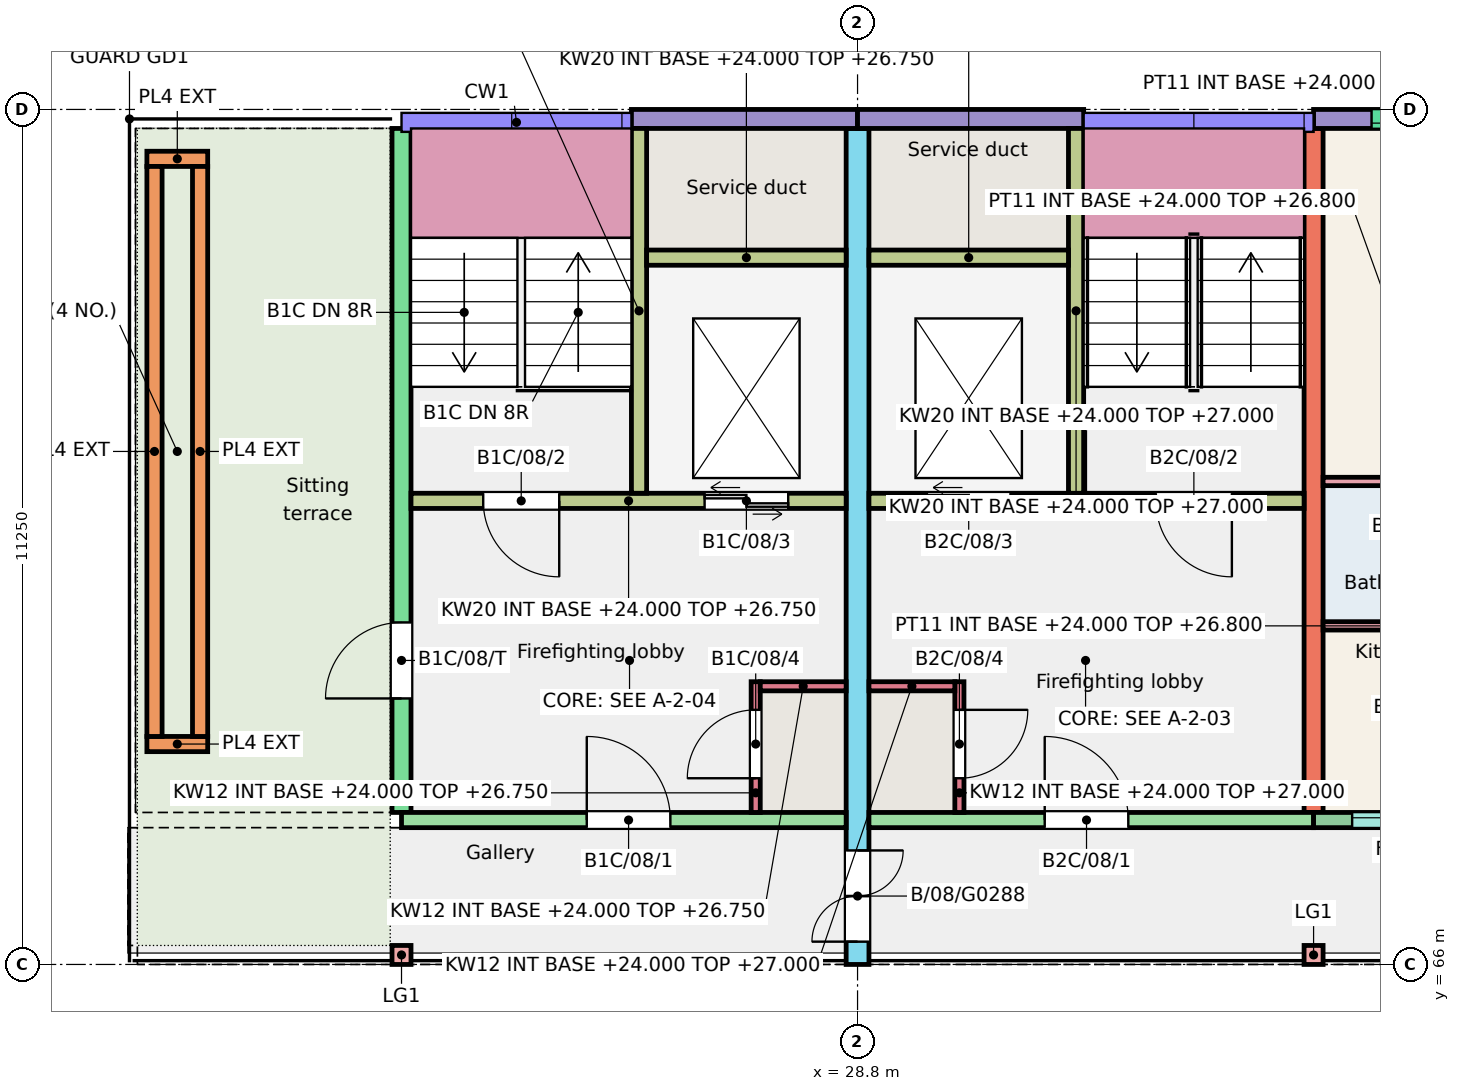
"""IFC4 building model, lengths in metres.
Left out: names, types, materials, properties, quantities, classifications, styles, units other than length and angle.
Written with IfcOpenShell. Run it as: python <this file> out.ifc"""

import sys

from ifc_helpers import new_model, si_unit, direction, frame, frame_2d, origin, origin_2d, place, context, subcontext, project, spatial, rectangle, extrude, element, fill, save


model = new_model("IFC4")
c1 = context("Model", 3, precision=1e-05, world=origin(), true_north=direction((0.0, 1.0)))
c2 = subcontext(c1, "Body", "Model", "MODEL_VIEW")
j1 = project(units=[si_unit("LENGTHUNIT", "METRE"), si_unit("PLANEANGLEUNIT", "RADIAN")], contexts=[c1])
p1 = place(None, origin())
s1 = spatial("IfcSite", under=j1, at=p1, CompositionType="ELEMENT")
p2 = place(p1, origin())
s2 = spatial("IfcBuilding", under=s1, at=p2, CompositionType="ELEMENT")
p3 = place(p2, frame((0.0, 0.0, 24.0)))
s3 = spatial("IfcBuildingStorey", under=s2, at=p3, CompositionType="ELEMENT", Elevation=24.0)
p4 = place(p3, frame((22.8, 68.0, 0.0), z_axis=(0.0, 0.0, 1.0), x_axis=(0.0, 1.0, 0.0)))
e1 = element("IfcWall", 1, at=p4, inside=s3, PredefinedType="SHEAR", context=c2, shape_type="SweptSolid", body=[
    extrude(rectangle(XDim=9.0, YDim=0.25, at=frame_2d((4.5, 0.0))), origin(), (0.0, 0.0, 1.0), 3.0),
])
p5 = place(p4, frame((1.5, 0.0, 0.0)))
e2 = element("IfcOpeningElement", 2, at=p5, cuts=e1, PredefinedType="OPENING", context=c2, shape_type="SweptSolid", body=[
    extrude(rectangle(XDim=1.0, YDim=2.1, at=frame_2d((0.5, 1.05))), frame((0.0, 0.135, 0.0), z_axis=(0.0, -1.0, 0.0), x_axis=(1.0, 0.0, 0.0)), (0.0, 0.0, 1.0), 0.27),
])
p6 = place(p3, frame((28.8, 66.0, 0.0), z_axis=(0.0, 0.0, 1.0), x_axis=(0.0, 1.0, 0.0)))
e3 = element("IfcWall", 3, at=p6, inside=s3, PredefinedType="SHEAR", context=c2, shape_type="SweptSolid", body=[
    extrude(rectangle(XDim=11.0, YDim=0.3, at=frame_2d((5.5, 0.0))), origin(), (0.0, 0.0, 1.0), 3.0),
])
p7 = place(p6, frame((0.3, 0.0, 0.0)))
e4 = element("IfcOpeningElement", 4, at=p7, cuts=e3, PredefinedType="OPENING", context=c2, shape_type="SweptSolid", body=[
    extrude(rectangle(XDim=1.2, YDim=2.1, at=frame_2d((0.6, 1.05))), frame((0.0, 0.16, 0.0), z_axis=(0.0, -1.0, 0.0), x_axis=(1.0, 0.0, 0.0)), (0.0, 0.0, 1.0), 0.32),
])
p8 = place(p3, frame((34.8, 68.0, 0.0), z_axis=(0.0, 0.0, 1.0), x_axis=(0.0, 1.0, 0.0)))
e5 = element("IfcWall", 5, at=p8, inside=s3, PredefinedType="SHEAR", context=c2, shape_type="SweptSolid", body=[
    extrude(rectangle(XDim=9.0, YDim=0.25, at=frame_2d((4.5, 0.0))), origin(), (0.0, 0.0, 1.0), 3.0),
])
p9 = place(p3, frame((25.825, 77.125, 0.0), z_axis=(0.0, 0.0, 1.0), x_axis=(1.0, 0.0, 0.0)))
e6 = element("IfcWall", 6, at=p9, inside=s3, PredefinedType="SOLIDWALL", context=c2, shape_type="SweptSolid", body=[
    extrude(rectangle(XDim=2.975, YDim=0.25, at=frame_2d((1.488, 0.0))), origin(), (0.0, 0.0, 1.0), 3.0),
])
p10 = place(p3, frame((22.8, 67.9, 0.0), z_axis=(0.0, 0.0, 1.0), x_axis=(1.0, 0.0, 0.0)))
e7 = element("IfcWall", 7, at=p10, inside=s3, PredefinedType="SHEAR", context=c2, shape_type="SweptSolid", body=[
    extrude(rectangle(XDim=5.85, YDim=0.2, at=frame_2d((2.925, 0.0))), origin(), (0.0, 0.0, 1.0), 2.75),
])
p11 = place(p10, frame((2.438, 0.0, 0.0)))
e8 = element("IfcOpeningElement", 8, at=p11, cuts=e7, PredefinedType="OPENING", context=c2, shape_type="SweptSolid", body=[
    extrude(rectangle(XDim=1.1, YDim=2.1, at=frame_2d((0.55, 1.05))), frame((0.0, 0.11, 0.0), z_axis=(0.0, -1.0, 0.0), x_axis=(1.0, 0.0, 0.0)), (0.0, 0.0, 1.0), 0.22),
])
p12 = place(p3, frame((22.925, 72.1, 0.0), z_axis=(0.0, 0.0, 1.0), x_axis=(1.0, 0.0, 0.0)))
e9 = element("IfcWall", 9, at=p12, inside=s3, PredefinedType="SHEAR", context=c2, shape_type="SweptSolid", body=[
    extrude(rectangle(XDim=5.725, YDim=0.2, at=frame_2d((2.862, 0.0))), origin(), (0.0, 0.0, 1.0), 2.75),
])
p13 = place(p12, frame((0.95, 0.0, 0.0)))
e10 = element("IfcOpeningElement", 10, at=p13, cuts=e9, PredefinedType="OPENING", context=c2, shape_type="SweptSolid", body=[
    extrude(rectangle(XDim=1.0, YDim=2.1, at=frame_2d((0.5, 1.05))), frame((0.0, 0.11, 0.0), z_axis=(0.0, -1.0, 0.0), x_axis=(1.0, 0.0, 0.0)), (0.0, 0.0, 1.0), 0.22),
])
p14 = place(p12, frame((3.863, 0.0, 0.0)))
e11 = element("IfcOpeningElement", 11, at=p14, cuts=e9, PredefinedType="OPENING", context=c2, shape_type="SweptSolid", body=[
    extrude(rectangle(XDim=1.1, YDim=2.1, at=frame_2d((0.55, 1.05))), frame((0.0, 0.11, 0.0), z_axis=(0.0, -1.0, 0.0), x_axis=(1.0, 0.0, 0.0)), (0.0, 0.0, 1.0), 0.22),
])
p15 = place(p3, frame((25.925, 72.2, 0.0), z_axis=(0.0, 0.0, 1.0), x_axis=(0.0, 1.0, 0.0)))
e12 = element("IfcWall", 12, at=p15, inside=s3, PredefinedType="SHEAR", context=c2, shape_type="SweptSolid", body=[
    extrude(rectangle(XDim=4.8, YDim=0.2, at=frame_2d((2.4, 0.0))), origin(), (0.0, 0.0, 1.0), 2.75),
])
p16 = place(p3, frame((26.025, 75.3, 0.0), z_axis=(0.0, 0.0, 1.0), x_axis=(1.0, 0.0, 0.0)))
e13 = element("IfcWall", 13, at=p16, inside=s3, PredefinedType="SHEAR", context=c2, shape_type="SweptSolid", body=[
    extrude(rectangle(XDim=2.625, YDim=0.2, at=frame_2d((1.312, 0.0))), origin(), (0.0, 0.0, 1.0), 2.75),
])
p17 = place(p3, frame((27.46, 68.0, 0.0), z_axis=(0.0, 0.0, 1.0), x_axis=(0.0, 1.0, 0.0)))
e14 = element("IfcWall", 14, at=p17, inside=s3, PredefinedType="SHEAR", context=c2, shape_type="SweptSolid", body=[
    extrude(rectangle(XDim=1.72, YDim=0.12, at=frame_2d((0.86, 0.0))), origin(), (0.0, 0.0, 1.0), 2.75),
])
p18 = place(p17, frame((0.45, 0.0, 0.0)))
e15 = element("IfcOpeningElement", 15, at=p18, cuts=e14, PredefinedType="OPENING", context=c2, shape_type="SweptSolid", body=[
    extrude(rectangle(XDim=0.9, YDim=2.1, at=frame_2d((0.45, 1.05))), frame((0.0, 0.07, 0.0), z_axis=(0.0, -1.0, 0.0), x_axis=(1.0, 0.0, 0.0)), (0.0, 0.0, 1.0), 0.14),
])
p19 = place(p3, frame((27.52, 69.66, 0.0), z_axis=(0.0, 0.0, 1.0), x_axis=(1.0, 0.0, 0.0)))
e16 = element("IfcWall", 16, at=p19, inside=s3, PredefinedType="SHEAR", context=c2, shape_type="SweptSolid", body=[
    extrude(rectangle(XDim=1.13, YDim=0.12, at=frame_2d((0.565, 0.0))), origin(), (0.0, 0.0, 1.0), 2.75),
])
p20 = place(p3, frame((28.8, 77.125, 0.0), z_axis=(0.0, 0.0, 1.0), x_axis=(1.0, 0.0, 0.0)))
e17 = element("IfcWall", 17, at=p20, inside=s3, PredefinedType="SOLIDWALL", context=c2, shape_type="SweptSolid", body=[
    extrude(rectangle(XDim=2.975, YDim=0.25, at=frame_2d((1.487, 0.0))), origin(), (0.0, 0.0, 1.0), 3.0),
])
p21 = place(p3, frame((28.95, 67.9, 0.0), z_axis=(0.0, 0.0, 1.0), x_axis=(1.0, 0.0, 0.0)))
e18 = element("IfcWall", 18, at=p21, inside=s3, PredefinedType="SHEAR", context=c2, shape_type="SweptSolid", body=[
    extrude(rectangle(XDim=5.85, YDim=0.2, at=frame_2d((2.925, 0.0))), origin(), (0.0, 0.0, 1.0), 3.0),
])
p22 = place(p21, frame((2.312, 0.0, 0.0)))
e19 = element("IfcOpeningElement", 19, at=p22, cuts=e18, PredefinedType="OPENING", context=c2, shape_type="SweptSolid", body=[
    extrude(rectangle(XDim=1.1, YDim=2.1, at=frame_2d((0.55, 1.05))), frame((0.0, 0.11, 0.0), z_axis=(0.0, -1.0, 0.0), x_axis=(1.0, 0.0, 0.0)), (0.0, 0.0, 1.0), 0.22),
])
p23 = place(p3, frame((28.95, 72.1, 0.0), z_axis=(0.0, 0.0, 1.0), x_axis=(1.0, 0.0, 0.0)))
e20 = element("IfcWall", 20, at=p23, inside=s3, PredefinedType="SHEAR", context=c2, shape_type="SweptSolid", body=[
    extrude(rectangle(XDim=5.725, YDim=0.2, at=frame_2d((2.863, 0.0))), origin(), (0.0, 0.0, 1.0), 3.0),
])
p24 = place(p23, frame((3.775, 0.0, 0.0)))
e21 = element("IfcOpeningElement", 21, at=p24, cuts=e20, PredefinedType="OPENING", context=c2, shape_type="SweptSolid", body=[
    extrude(rectangle(XDim=1.0, YDim=2.1, at=frame_2d((0.5, 1.05))), frame((0.0, 0.11, 0.0), z_axis=(0.0, -1.0, 0.0), x_axis=(1.0, 0.0, 0.0)), (0.0, 0.0, 1.0), 0.22),
])
p25 = place(p23, frame((0.762, 0.0, 0.0)))
e22 = element("IfcOpeningElement", 22, at=p25, cuts=e20, PredefinedType="OPENING", context=c2, shape_type="SweptSolid", body=[
    extrude(rectangle(XDim=1.1, YDim=2.1, at=frame_2d((0.55, 1.05))), frame((0.0, 0.11, 0.0), z_axis=(0.0, -1.0, 0.0), x_axis=(1.0, 0.0, 0.0)), (0.0, 0.0, 1.0), 0.22),
])
p26 = place(p3, frame((31.675, 72.2, 0.0), z_axis=(0.0, 0.0, 1.0), x_axis=(0.0, 1.0, 0.0)))
e23 = element("IfcWall", 23, at=p26, inside=s3, PredefinedType="SHEAR", context=c2, shape_type="SweptSolid", body=[
    extrude(rectangle(XDim=4.8, YDim=0.2, at=frame_2d((2.4, 0.0))), origin(), (0.0, 0.0, 1.0), 3.0),
])
p27 = place(p3, frame((28.95, 75.3, 0.0), z_axis=(0.0, 0.0, 1.0), x_axis=(1.0, 0.0, 0.0)))
e24 = element("IfcWall", 24, at=p27, inside=s3, PredefinedType="SHEAR", context=c2, shape_type="SweptSolid", body=[
    extrude(rectangle(XDim=2.625, YDim=0.2, at=frame_2d((1.312, 0.0))), origin(), (0.0, 0.0, 1.0), 3.0),
])
p28 = place(p3, frame((30.14, 68.0, 0.0), z_axis=(0.0, 0.0, 1.0), x_axis=(0.0, 1.0, 0.0)))
e25 = element("IfcWall", 25, at=p28, inside=s3, PredefinedType="SHEAR", context=c2, shape_type="SweptSolid", body=[
    extrude(rectangle(XDim=1.72, YDim=0.12, at=frame_2d((0.86, 0.0))), origin(), (0.0, 0.0, 1.0), 3.0),
])
p29 = place(p28, frame((0.45, 0.0, 0.0)))
e26 = element("IfcOpeningElement", 26, at=p29, cuts=e25, PredefinedType="OPENING", context=c2, shape_type="SweptSolid", body=[
    extrude(rectangle(XDim=0.9, YDim=2.1, at=frame_2d((0.45, 1.05))), frame((0.0, 0.07, 0.0), z_axis=(0.0, -1.0, 0.0), x_axis=(1.0, 0.0, 0.0)), (0.0, 0.0, 1.0), 0.14),
])
p30 = place(p3, frame((28.95, 69.66, 0.0), z_axis=(0.0, 0.0, 1.0), x_axis=(1.0, 0.0, 0.0)))
e27 = element("IfcWall", 27, at=p30, inside=s3, PredefinedType="SHEAR", context=c2, shape_type="SweptSolid", body=[
    extrude(rectangle(XDim=1.13, YDim=0.12, at=frame_2d((0.565, 0.0))), origin(), (0.0, 0.0, 1.0), 3.0),
])
p31 = place(p3, frame((34.8, 77.125, 0.0), z_axis=(0.0, 0.0, 1.0), x_axis=(1.0, 0.0, 0.0)))
e28 = element("IfcWall", 28, at=p31, inside=s3, PredefinedType="SOLIDWALL", context=c2, shape_type="SweptSolid", body=[
    extrude(rectangle(XDim=3.6, YDim=0.25, at=frame_2d((1.8, 0.0))), origin(), (0.0, 0.0, 1.0), 3.0),
])
p32 = place(p31, frame((0.762, 0.0, 1.2)))
e29 = element("IfcOpeningElement", 29, at=p32, cuts=e28, PredefinedType="OPENING", context=c2, shape_type="SweptSolid", body=[
    extrude(rectangle(XDim=2.1, YDim=1.2, at=frame_2d((1.05, 0.6))), frame((0.0, 0.135, 0.0), z_axis=(0.0, -1.0, 0.0), x_axis=(1.0, 0.0, 0.0)), (0.0, 0.0, 1.0), 0.27),
])
p33 = place(p3, frame((34.8, 67.9, 0.0), z_axis=(0.0, 0.0, 1.0), x_axis=(1.0, 0.0, 0.0)))
e30 = element("IfcWall", 30, at=p33, inside=s3, PredefinedType="SOLIDWALL", context=c2, shape_type="SweptSolid", body=[
    extrude(rectangle(XDim=3.6, YDim=0.2, at=frame_2d((1.8, 0.0))), origin(), (0.0, 0.0, 1.0), 3.0),
])
p34 = place(p33, frame((0.508, 0.0, 1.1)))
e31 = element("IfcOpeningElement", 31, at=p34, cuts=e30, PredefinedType="OPENING", context=c2, shape_type="SweptSolid", body=[
    extrude(rectangle(XDim=1.2, YDim=1.3, at=frame_2d((0.6, 0.65))), frame((0.0, 0.11, 0.0), z_axis=(0.0, -1.0, 0.0), x_axis=(1.0, 0.0, 0.0)), (0.0, 0.0, 1.0), 0.22),
])
p35 = place(p33, frame((2.35, 0.0, 0.0)))
e32 = element("IfcOpeningElement", 32, at=p35, cuts=e30, PredefinedType="OPENING", context=c2, shape_type="SweptSolid", body=[
    extrude(rectangle(XDim=1.0, YDim=2.1, at=frame_2d((0.5, 1.05))), frame((0.0, 0.11, 0.0), z_axis=(0.0, -1.0, 0.0), x_axis=(1.0, 0.0, 0.0)), (0.0, 0.0, 1.0), 0.22),
])
for number, where, z_axis, x_axis in (
    (33, (22.8, 66.125, 0.0), (0.0, 0.0, 1.0), (1.0, 0.0, 0.0)),
    (34, (34.8, 66.125, 0.0), (0.0, 0.0, 1.0), (1.0, 0.0, 0.0)),
):
    element("IfcColumn", number, at=place(p3, frame(where, z_axis=z_axis, x_axis=x_axis)), inside=s3, PredefinedType="COLUMN", context=c2, shape_type="SweptSolid", body=[
        extrude(rectangle(XDim=0.25, YDim=0.25, at=origin_2d()), origin(), (0.0, 0.0, 1.0), 3.0),
    ])
for number, where, z_axis, x_axis in (
    (35, (19.45, 68.9, 0.01), (0.0, 0.0, 1.0), (1.0, 0.0, 0.0)),
    (36, (19.45, 76.6, 0.01), (0.0, 0.0, 1.0), (1.0, 0.0, 0.0)),
):
    element("IfcWall", number, at=place(p3, frame(where, z_axis=z_axis, x_axis=x_axis)), inside=s3, PredefinedType="SOLIDWALL", context=c2, shape_type="SweptSolid", body=[
        extrude(rectangle(XDim=0.8, YDim=0.2, at=frame_2d((0.4, 0.0))), origin(), (0.0, 0.0, 1.0), 0.45),
    ])
for number, where, z_axis, x_axis in (
    (37, (19.55, 69.0, 0.01), (0.0, 0.0, 1.0), (0.0, 1.0, 0.0)),
    (38, (20.15, 69.0, 0.01), (0.0, 0.0, 1.0), (0.0, 1.0, 0.0)),
):
    element("IfcWall", number, at=place(p3, frame(where, z_axis=z_axis, x_axis=x_axis)), inside=s3, PredefinedType="SOLIDWALL", context=c2, shape_type="SweptSolid", body=[
        extrude(rectangle(XDim=7.5, YDim=0.2, at=frame_2d((3.75, 0.0))), origin(), (0.0, 0.0, 1.0), 0.45),
    ])
p36 = place(p3, frame((34.925, 70.455, 0.0), z_axis=(0.0, 0.0, 1.0), x_axis=(1.0, 0.0, 0.0)))
e39 = element("IfcWall", 39, at=p36, inside=s3, PredefinedType="PARTITIONING", context=c2, shape_type="SweptSolid", body=[
    extrude(rectangle(XDim=1.965, YDim=0.11, at=frame_2d((0.982, 0.0))), origin(), (0.0, 0.0, 1.0), 2.8),
])
p37 = place(p3, frame((34.925, 72.355, 0.0), z_axis=(0.0, 0.0, 1.0), x_axis=(1.0, 0.0, 0.0)))
e40 = element("IfcWall", 40, at=p37, inside=s3, PredefinedType="PARTITIONING", context=c2, shape_type="SweptSolid", body=[
    extrude(rectangle(XDim=3.375, YDim=0.11, at=frame_2d((1.688, 0.0))), origin(), (0.0, 0.0, 1.0), 2.8),
])
p38 = place(p37, frame((2.275, 0.0, 0.0)))
e41 = element("IfcOpeningElement", 41, at=p38, cuts=e40, PredefinedType="OPENING", context=c2, shape_type="SweptSolid", body=[
    extrude(rectangle(XDim=0.9, YDim=2.1, at=frame_2d((0.45, 1.05))), frame((0.0, 0.065, 0.0), z_axis=(0.0, -1.0, 0.0), x_axis=(1.0, 0.0, 0.0)), (0.0, 0.0, 1.0), 0.13),
])
p39 = place(p34, origin())
e42 = element("IfcWindow", 42, at=p39, inside=s3, PartitioningType="SINGLE_PANEL", PredefinedType="WINDOW", context=c2, shape_type="SweptSolid", body=[
    extrude(rectangle(XDim=1.2, YDim=1.3, at=frame_2d((0.6, 0.65))), frame((0.0, 0.06, 0.0), z_axis=(0.0, -1.0, 0.0), x_axis=(1.0, 0.0, 0.0)), (0.0, 0.0, 1.0), 0.06),
])
fill(e31, e42)
p40 = place(p32, origin())
e43 = element("IfcWindow", 43, at=p40, inside=s3, PartitioningType="SINGLE_PANEL", PredefinedType="WINDOW", context=c2, shape_type="SweptSolid", body=[
    extrude(rectangle(XDim=2.1, YDim=1.2, at=frame_2d((1.05, 0.6))), frame((0.0, -0.025, 0.0), z_axis=(0.0, -1.0, 0.0), x_axis=(1.0, 0.0, 0.0)), (0.0, 0.0, 1.0), 0.06),
])
fill(e29, e43)
p41 = place(p11, origin())
e44 = element("IfcDoor", 44, at=p41, inside=s3, OperationType="SINGLE_SWING_LEFT", PredefinedType="DOOR", context=c2, shape_type="SweptSolid", body=[
    extrude(rectangle(XDim=1.1, YDim=2.1, at=frame_2d((0.55, 1.05))), frame((0.0, 0.025, 0.0), z_axis=(0.0, -1.0, 0.0), x_axis=(1.0, 0.0, 0.0)), (0.0, 0.0, 1.0), 0.05),
])
fill(e8, e44)
p42 = place(p13, origin())
e45 = element("IfcDoor", 45, at=p42, inside=s3, OperationType="SINGLE_SWING_RIGHT", PredefinedType="DOOR", context=c2, shape_type="SweptSolid", body=[
    extrude(rectangle(XDim=1.0, YDim=2.1, at=frame_2d((0.5, 1.05))), frame((0.0, 0.025, 0.0), z_axis=(0.0, -1.0, 0.0), x_axis=(1.0, 0.0, 0.0)), (0.0, 0.0, 1.0), 0.05),
])
fill(e10, e45)
p43 = place(p14, origin())
e46 = element("IfcDoor", 46, at=p43, inside=s3, OperationType="DOUBLE_DOOR_SLIDING", PredefinedType="DOOR", context=c2, shape_type="SweptSolid", body=[
    extrude(rectangle(XDim=1.1, YDim=2.1, at=frame_2d((0.55, 1.05))), frame((0.0, 0.025, 0.0), z_axis=(0.0, -1.0, 0.0), x_axis=(1.0, 0.0, 0.0)), (0.0, 0.0, 1.0), 0.05),
])
fill(e11, e46)
p44 = place(p18, origin())
e47 = element("IfcDoor", 47, at=p44, inside=s3, OperationType="SINGLE_SWING_LEFT", PredefinedType="DOOR", context=c2, shape_type="SweptSolid", body=[
    extrude(rectangle(XDim=0.9, YDim=2.1, at=frame_2d((0.45, 1.05))), frame((0.0, 0.025, 0.0), z_axis=(0.0, -1.0, 0.0), x_axis=(1.0, 0.0, 0.0)), (0.0, 0.0, 1.0), 0.05),
])
fill(e15, e47)
p45 = place(p22, origin())
e48 = element("IfcDoor", 48, at=p45, inside=s3, OperationType="SINGLE_SWING_LEFT", PredefinedType="DOOR", context=c2, shape_type="SweptSolid", body=[
    extrude(rectangle(XDim=1.1, YDim=2.1, at=frame_2d((0.55, 1.05))), frame((0.0, 0.025, 0.0), z_axis=(0.0, -1.0, 0.0), x_axis=(1.0, 0.0, 0.0)), (0.0, 0.0, 1.0), 0.05),
])
fill(e19, e48)
p46 = place(p24, origin())
e49 = element("IfcDoor", 49, at=p46, inside=s3, OperationType="SINGLE_SWING_RIGHT", PredefinedType="DOOR", context=c2, shape_type="SweptSolid", body=[
    extrude(rectangle(XDim=1.0, YDim=2.1, at=frame_2d((0.5, 1.05))), frame((0.0, 0.025, 0.0), z_axis=(0.0, -1.0, 0.0), x_axis=(1.0, 0.0, 0.0)), (0.0, 0.0, 1.0), 0.05),
])
fill(e21, e49)
p47 = place(p25, origin())
e50 = element("IfcDoor", 50, at=p47, inside=s3, OperationType="DOUBLE_DOOR_SLIDING", PredefinedType="DOOR", context=c2, shape_type="SweptSolid", body=[
    extrude(rectangle(XDim=1.1, YDim=2.1, at=frame_2d((0.55, 1.05))), frame((0.0, 0.025, 0.0), z_axis=(0.0, -1.0, 0.0), x_axis=(1.0, 0.0, 0.0)), (0.0, 0.0, 1.0), 0.05),
])
fill(e22, e50)
p48 = place(p29, origin())
e51 = element("IfcDoor", 51, at=p48, inside=s3, OperationType="SINGLE_SWING_RIGHT", PredefinedType="DOOR", context=c2, shape_type="SweptSolid", body=[
    extrude(rectangle(XDim=0.9, YDim=2.1, at=frame_2d((0.45, 1.05))), frame((0.0, 0.025, 0.0), z_axis=(0.0, -1.0, 0.0), x_axis=(1.0, 0.0, 0.0)), (0.0, 0.0, 1.0), 0.05),
])
fill(e26, e51)
p49 = place(p5, origin())
e52 = element("IfcDoor", 52, at=p49, inside=s3, OperationType="SINGLE_SWING_LEFT", PredefinedType="DOOR", context=c2, shape_type="SweptSolid", body=[
    extrude(rectangle(XDim=1.0, YDim=2.1, at=frame_2d((0.5, 1.05))), frame((0.0, 0.025, 0.0), z_axis=(0.0, -1.0, 0.0), x_axis=(1.0, 0.0, 0.0)), (0.0, 0.0, 1.0), 0.05),
])
fill(e2, e52)
p50 = place(p7, origin())
e53 = element("IfcDoor", 53, at=p50, inside=s3, OperationType="DOUBLE_DOOR_SINGLE_SWING", PredefinedType="DOOR", context=c2, shape_type="SweptSolid", body=[
    extrude(rectangle(XDim=1.2, YDim=2.1, at=frame_2d((0.6, 1.05))), frame((0.0, 0.025, 0.0), z_axis=(0.0, -1.0, 0.0), x_axis=(1.0, 0.0, 0.0)), (0.0, 0.0, 1.0), 0.05),
])
fill(e4, e53)
save(model, sys.argv[1])
